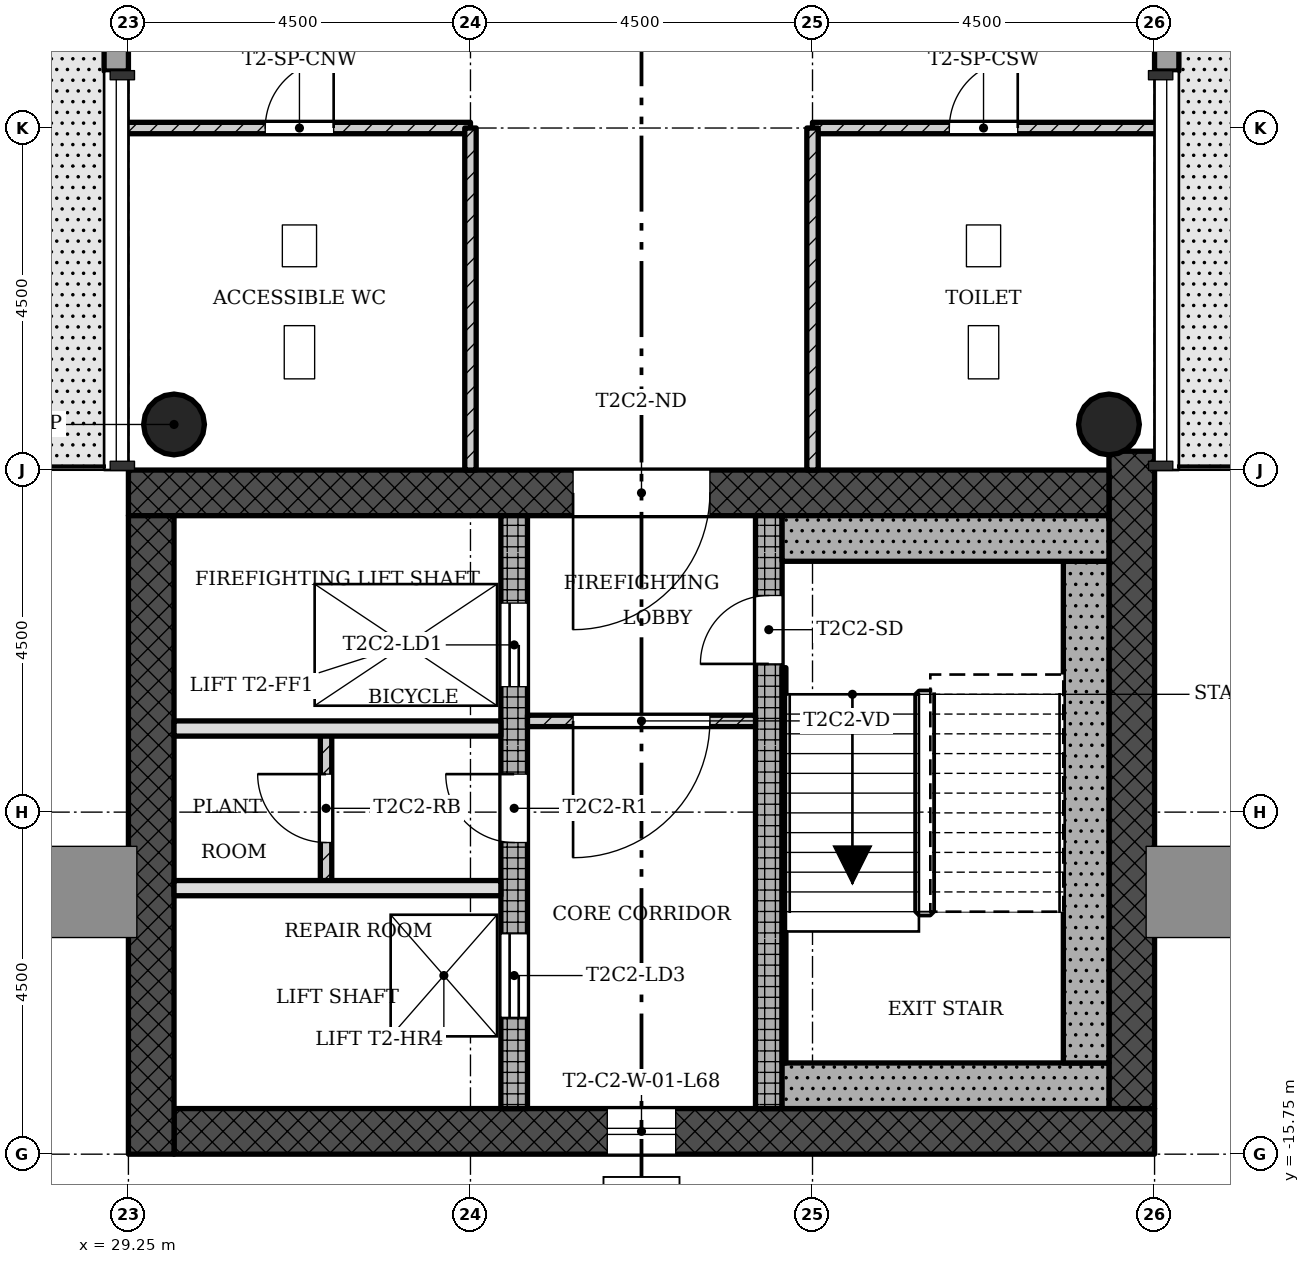
"""IFC4 building model, lengths in metres.
Left out: names, types, materials, properties, quantities, classifications, styles, units other than length and angle.
Written with IfcOpenShell. Run it as: python <this file> out.ifc"""

import sys

from ifc_helpers import new_model, si_unit, direction, frame, frame_2d, origin, origin_2d, place, context, subcontext, project, spatial, rectangle, hollow_circle, extrude, element, fill, save


model = new_model("IFC4")
c1 = context("Model", 3, precision=1e-05, world=origin(), true_north=direction((0.0, 1.0)))
c2 = subcontext(c1, "Body", "Model", "MODEL_VIEW")
j1 = project(units=[si_unit("LENGTHUNIT", "METRE"), si_unit("PLANEANGLEUNIT", "RADIAN")], contexts=[c1])
p1 = place(None, origin())
s1 = spatial("IfcSite", under=j1, at=p1, CompositionType="ELEMENT")
p2 = place(p1, origin())
s2 = spatial("IfcBuilding", under=s1, at=p2, CompositionType="ELEMENT")
p3 = place(p2, frame((0.0, 0.0, 246.9)))
s3 = spatial("IfcBuildingStorey", under=s2, at=p3, CompositionType="ELEMENT", Elevation=246.9)
p4 = place(p3, frame((29.85, -15.45, 0.0), z_axis=(0.0, 0.0, 1.0), x_axis=(1.0, 0.0, 0.0)))
e1 = element("IfcWall", 1, at=p4, inside=s3, PredefinedType="SHEAR", context=c2, shape_type="SweptSolid", body=[
    extrude(rectangle(XDim=12.9, YDim=0.6, at=frame_2d((6.45, 0.0))), origin(), (0.0, 0.0, 1.0), 4.5),
])
p5 = place(p4, frame((5.7, 0.0, 0.45)))
e2 = element("IfcOpeningElement", 2, at=p5, cuts=e1, PredefinedType="OPENING", context=c2, shape_type="SweptSolid", body=[
    extrude(rectangle(XDim=0.9, YDim=2.4, at=frame_2d((0.45, 1.2))), frame((0.0, 0.31, 0.0), z_axis=(0.0, -1.0, 0.0), x_axis=(1.0, 0.0, 0.0)), (0.0, 0.0, 1.0), 0.62),
])
p6 = place(p3, frame((42.45, -15.15, 0.0), z_axis=(0.0, 0.0, 1.0), x_axis=(0.0, 1.0, 0.0)))
e3 = element("IfcWall", 3, at=p6, inside=s3, PredefinedType="SHEAR", context=c2, shape_type="SweptSolid", body=[
    extrude(rectangle(XDim=8.648, YDim=0.6, at=frame_2d((4.324, 0.0))), origin(), (0.0, 0.0, 1.0), 4.5),
])
p7 = place(p3, frame((42.15, -7.05, 0.0), z_axis=(0.0, 0.0, 1.0), x_axis=(-1.0, 0.0, 0.0)))
e4 = element("IfcWall", 4, at=p7, inside=s3, PredefinedType="SHEAR", context=c2, shape_type="SweptSolid", body=[
    extrude(rectangle(XDim=12.9, YDim=0.6, at=frame_2d((6.45, 0.0))), origin(), (0.0, 0.0, 1.0), 4.5),
])
p8 = place(p7, frame((5.25, 0.0, 0.0)))
e5 = element("IfcOpeningElement", 5, at=p8, cuts=e4, PredefinedType="OPENING", context=c2, shape_type="SweptSolid", body=[
    extrude(rectangle(XDim=1.8, YDim=2.1, at=frame_2d((0.9, 1.05))), frame((0.0, 0.31, 0.0), z_axis=(0.0, -1.0, 0.0), x_axis=(1.0, 0.0, 0.0)), (0.0, 0.0, 1.0), 0.62),
])
p9 = place(p3, frame((29.55, -7.35, 0.0), z_axis=(0.0, 0.0, 1.0), x_axis=(0.0, -1.0, 0.0)))
e6 = element("IfcWall", 6, at=p9, inside=s3, PredefinedType="SHEAR", context=c2, shape_type="SweptSolid", body=[
    extrude(rectangle(XDim=8.4, YDim=0.6, at=frame_2d((4.2, 0.0))), origin(), (0.0, 0.0, 1.0), 4.5),
])
p10 = place(p3, frame((34.325, -15.15, 0.0), z_axis=(0.0, 0.0, 1.0), x_axis=(0.0, 1.0, 0.0)))
e7 = element("IfcWall", 7, at=p10, inside=s3, PredefinedType="SHEAR", context=c2, shape_type="SweptSolid", body=[
    extrude(rectangle(XDim=7.8, YDim=0.35, at=frame_2d((3.9, 0.0))), origin(), (0.0, 0.0, 1.0), 4.5),
])
p11 = place(p10, frame((5.55, 0.0, 0.0)))
e8 = element("IfcOpeningElement", 8, at=p11, cuts=e7, PredefinedType="OPENING", context=c2, shape_type="SweptSolid", body=[
    extrude(rectangle(XDim=1.1, YDim=2.1, at=frame_2d((0.55, 1.05))), frame((0.0, 0.185, 0.0), z_axis=(0.0, -1.0, 0.0), x_axis=(1.0, 0.0, 0.0)), (0.0, 0.0, 1.0), 0.37),
])
p12 = place(p10, frame((1.2, 0.0, 0.0)))
e9 = element("IfcOpeningElement", 9, at=p12, cuts=e7, PredefinedType="OPENING", context=c2, shape_type="SweptSolid", body=[
    extrude(rectangle(XDim=1.1, YDim=2.1, at=frame_2d((0.55, 1.05))), frame((0.0, 0.185, 0.0), z_axis=(0.0, -1.0, 0.0), x_axis=(1.0, 0.0, 0.0)), (0.0, 0.0, 1.0), 0.37),
])
p13 = place(p10, frame((3.5, 0.0, 0.0)))
e10 = element("IfcOpeningElement", 10, at=p13, cuts=e7, PredefinedType="OPENING", context=c2, shape_type="SweptSolid", body=[
    extrude(rectangle(XDim=0.9, YDim=2.1, at=frame_2d((0.45, 1.05))), frame((0.0, 0.185, 0.0), z_axis=(0.0, -1.0, 0.0), x_axis=(1.0, 0.0, 0.0)), (0.0, 0.0, 1.0), 0.37),
])
p14 = place(p3, frame((37.675, -15.15, 0.0), z_axis=(0.0, 0.0, 1.0), x_axis=(0.0, 1.0, 0.0)))
e11 = element("IfcWall", 11, at=p14, inside=s3, PredefinedType="SHEAR", context=c2, shape_type="SweptSolid", body=[
    extrude(rectangle(XDim=7.8, YDim=0.35, at=frame_2d((3.9, 0.0))), origin(), (0.0, 0.0, 1.0), 4.5),
])
p15 = place(p14, frame((5.85, 0.0, 0.0)))
e12 = element("IfcOpeningElement", 12, at=p15, cuts=e11, PredefinedType="OPENING", context=c2, shape_type="SweptSolid", body=[
    extrude(rectangle(XDim=0.9, YDim=2.1, at=frame_2d((0.45, 1.05))), frame((0.0, 0.185, 0.0), z_axis=(0.0, -1.0, 0.0), x_axis=(1.0, 0.0, 0.0)), (0.0, 0.0, 1.0), 0.37),
])
for number, where, z_axis, x_axis in (
    (13, (42.15, -6.15, 0.0), (0.0, 0.0, 1.0), (1.0, 0.0, 0.0)),
    (14, (29.85, -6.15, 0.0), (0.0, 0.0, 1.0), (1.0, 0.0, 0.0)),
):
    element("IfcColumn", number, at=place(p3, frame(where, z_axis=z_axis, x_axis=x_axis)), inside=s3, PredefinedType="COLUMN", context=c2, shape_type="SweptSolid", body=[
        extrude(hollow_circle(Radius=0.4, WallThickness=0.028, at=origin_2d()), origin(), (0.0, 0.0, 1.0), 4.5),
    ])
p16 = place(p3, frame((42.91, -1.5, -0.02), z_axis=(0.0, 0.0, 1.0), x_axis=(0.0, 1.0, 0.0)))
e15 = element("IfcWall", 15, at=p16, inside=s3, PredefinedType="STANDARD", context=c2, shape_type="SweptSolid", body=[
    extrude(rectangle(XDim=3.0, YDim=0.32, at=frame_2d((1.5, 0.0))), origin(), (0.0, 0.0, 1.0), 4.22),
])
p17 = place(p16, frame((1.0, 0.0, 0.02)))
e16 = element("IfcOpeningElement", 16, at=p17, cuts=e15, PredefinedType="OPENING", context=c2, shape_type="SweptSolid", body=[
    extrude(rectangle(XDim=1.0, YDim=2.1, at=frame_2d((0.5, 1.05))), frame((0.0, 0.17, 0.0), z_axis=(0.0, -1.0, 0.0), x_axis=(1.0, 0.0, 0.0)), (0.0, 0.0, 1.0), 0.34),
])
p18 = place(p3, frame((29.09, 1.5, -0.02), z_axis=(0.0, 0.0, 1.0), x_axis=(0.0, -1.0, 0.0)))
e17 = element("IfcWall", 17, at=p18, inside=s3, PredefinedType="STANDARD", context=c2, shape_type="SweptSolid", body=[
    extrude(rectangle(XDim=3.0, YDim=0.32, at=frame_2d((1.5, 0.0))), origin(), (0.0, 0.0, 1.0), 4.22),
])
p19 = place(p18, frame((1.0, 0.0, 0.02)))
e18 = element("IfcOpeningElement", 18, at=p19, cuts=e17, PredefinedType="OPENING", context=c2, shape_type="SweptSolid", body=[
    extrude(rectangle(XDim=1.0, YDim=2.1, at=frame_2d((0.5, 1.05))), frame((0.0, 0.17, 0.0), z_axis=(0.0, -1.0, 0.0), x_axis=(1.0, 0.0, 0.0)), (0.0, 0.0, 1.0), 0.34),
])
p20 = place(p3, frame((34.5, -10.05, 0.0), z_axis=(0.0, 0.0, 1.0), x_axis=(1.0, 0.0, 0.0)))
e19 = element("IfcWall", 19, at=p20, inside=s3, PredefinedType="PARTITIONING", context=c2, shape_type="SweptSolid", body=[
    extrude(rectangle(XDim=3.0, YDim=0.15, at=frame_2d((1.5, 0.0))), origin(), (0.0, 0.0, 1.0), 4.1),
])
p21 = place(p20, frame((0.6, 0.0, 0.0)))
e20 = element("IfcOpeningElement", 20, at=p21, cuts=e19, PredefinedType="OPENING", context=c2, shape_type="SweptSolid", body=[
    extrude(rectangle(XDim=1.8, YDim=2.1, at=frame_2d((0.9, 1.05))), frame((0.0, 0.085, 0.0), z_axis=(0.0, -1.0, 0.0), x_axis=(1.0, 0.0, 0.0)), (0.0, 0.0, 1.0), 0.17),
])
for number, where, z_axis, x_axis in (
    (21, (29.85, -12.25, 0.0), (0.0, 0.0, 1.0), (1.0, 0.0, 0.0)),
    (22, (29.85, -10.15, 0.0), (0.0, 0.0, 1.0), (1.0, 0.0, 0.0)),
):
    element("IfcWall", number, at=place(p3, frame(where, z_axis=z_axis, x_axis=x_axis)), inside=s3, PredefinedType="SOLIDWALL", context=c2, shape_type="SweptSolid", body=[
        extrude(rectangle(XDim=4.3, YDim=0.2, at=frame_2d((2.15, 0.0))), origin(), (0.0, 0.0, 1.0), 4.1),
    ])
p22 = place(p3, frame((31.85, -10.15, 0.0), z_axis=(0.0, 0.0, 1.0), x_axis=(0.0, -1.0, 0.0)))
e23 = element("IfcWall", 23, at=p22, inside=s3, PredefinedType="PARTITIONING", context=c2, shape_type="SweptSolid", body=[
    extrude(rectangle(XDim=2.1, YDim=0.15, at=frame_2d((1.05, 0.0))), origin(), (0.0, 0.0, 1.0), 4.1),
])
p23 = place(p22, frame((0.6, 0.0, 0.0)))
e24 = element("IfcOpeningElement", 24, at=p23, cuts=e23, PredefinedType="OPENING", context=c2, shape_type="SweptSolid", body=[
    extrude(rectangle(XDim=0.9, YDim=2.1, at=frame_2d((0.45, 1.05))), frame((0.0, 0.085, 0.0), z_axis=(0.0, -1.0, 0.0), x_axis=(1.0, 0.0, 0.0)), (0.0, 0.0, 1.0), 0.17),
])
p24 = place(p3, frame((33.75, -2.25, 0.0), z_axis=(0.0, 0.0, 1.0), x_axis=(-1.0, 0.0, 0.0)))
e25 = element("IfcWall", 25, at=p24, inside=s3, PredefinedType="PARTITIONING", context=c2, shape_type="SweptSolid", body=[
    extrude(rectangle(XDim=4.6, YDim=0.15, at=frame_2d((2.3, 0.0))), origin(), (0.0, 0.0, 1.0), 4.1),
])
p25 = place(p24, frame((1.8, 0.0, 0.0)))
e26 = element("IfcOpeningElement", 26, at=p25, cuts=e25, PredefinedType="OPENING", context=c2, shape_type="SweptSolid", body=[
    extrude(rectangle(XDim=0.9, YDim=2.1, at=frame_2d((0.45, 1.05))), frame((0.0, 0.085, 0.0), z_axis=(0.0, -1.0, 0.0), x_axis=(1.0, 0.0, 0.0)), (0.0, 0.0, 1.0), 0.17),
])
p26 = place(p3, frame((33.75, -6.75, 0.0), z_axis=(0.0, 0.0, 1.0), x_axis=(0.0, 1.0, 0.0)))
e27 = element("IfcWall", 27, at=p26, inside=s3, PredefinedType="PARTITIONING", context=c2, shape_type="SweptSolid", body=[
    extrude(rectangle(XDim=4.5, YDim=0.15, at=frame_2d((2.25, 0.0))), origin(), (0.0, 0.0, 1.0), 4.1),
])
p27 = place(p3, frame((42.85, -2.25, 0.0), z_axis=(0.0, 0.0, 1.0), x_axis=(-1.0, 0.0, 0.0)))
e28 = element("IfcWall", 28, at=p27, inside=s3, PredefinedType="PARTITIONING", context=c2, shape_type="SweptSolid", body=[
    extrude(rectangle(XDim=4.6, YDim=0.15, at=frame_2d((2.3, 0.0))), origin(), (0.0, 0.0, 1.0), 4.1),
])
p28 = place(p27, frame((1.9, 0.0, 0.0)))
e29 = element("IfcOpeningElement", 29, at=p28, cuts=e28, PredefinedType="OPENING", context=c2, shape_type="SweptSolid", body=[
    extrude(rectangle(XDim=0.9, YDim=2.1, at=frame_2d((0.45, 1.05))), frame((0.0, 0.085, 0.0), z_axis=(0.0, -1.0, 0.0), x_axis=(1.0, 0.0, 0.0)), (0.0, 0.0, 1.0), 0.17),
])
p29 = place(p3, frame((38.25, -6.75, 0.0), z_axis=(0.0, 0.0, 1.0), x_axis=(0.0, 1.0, 0.0)))
e30 = element("IfcWall", 30, at=p29, inside=s3, PredefinedType="PARTITIONING", context=c2, shape_type="SweptSolid", body=[
    extrude(rectangle(XDim=4.5, YDim=0.15, at=frame_2d((2.25, 0.0))), origin(), (0.0, 0.0, 1.0), 4.1),
])
p30 = place(p3, frame((37.85, -14.85, 0.0), z_axis=(0.0, 0.0, 1.0), x_axis=(1.0, 0.0, 0.0)))
e31 = element("IfcWall", 31, at=p30, inside=s3, PredefinedType="SHEAR", context=c2, shape_type="SweptSolid", body=[
    extrude(rectangle(XDim=4.3, YDim=0.6, at=frame_2d((2.15, 0.0))), origin(), (0.0, 0.0, 1.0), 4.5),
])
p31 = place(p3, frame((41.85, -7.95, 0.0), z_axis=(0.0, 0.0, 1.0), x_axis=(0.0, -1.0, 0.0)))
e32 = element("IfcWall", 32, at=p31, inside=s3, PredefinedType="SHEAR", context=c2, shape_type="SweptSolid", body=[
    extrude(rectangle(XDim=6.6, YDim=0.6, at=frame_2d((3.3, 0.0))), origin(), (0.0, 0.0, 1.0), 4.5),
])
p32 = place(p3, frame((37.85, -7.65, 0.0), z_axis=(0.0, 0.0, 1.0), x_axis=(1.0, 0.0, 0.0)))
e33 = element("IfcWall", 33, at=p32, inside=s3, PredefinedType="SHEAR", context=c2, shape_type="SweptSolid", body=[
    extrude(rectangle(XDim=4.3, YDim=0.6, at=frame_2d((2.15, 0.0))), origin(), (0.0, 0.0, 1.0), 4.5),
])
p33 = place(p3, frame((37.875, -9.35, 0.0), z_axis=(0.0, 0.0, 1.0), x_axis=(0.0, -1.0, 0.0)))
e34 = element("IfcWall", 34, at=p33, inside=s3, PredefinedType="SHEAR", context=c2, shape_type="SweptSolid", body=[
    extrude(rectangle(XDim=5.2, YDim=0.05, at=frame_2d((2.6, 0.0))), origin(), (0.0, 0.0, 1.0), 4.5),
])
p34 = place(p5, origin())
e35 = element("IfcWindow", 35, at=p34, inside=s3, PartitioningType="SINGLE_PANEL", PredefinedType="WINDOW", context=c2, shape_type="SweptSolid", body=[
    extrude(rectangle(XDim=0.9, YDim=2.4, at=frame_2d((0.45, 1.2))), frame((0.0, 0.03, 0.0), z_axis=(0.0, -1.0, 0.0), x_axis=(1.0, 0.0, 0.0)), (0.0, 0.0, 1.0), 0.06),
])
fill(e2, e35)
p35 = place(p21, origin())
e36 = element("IfcDoor", 36, at=p35, inside=s3, OperationType="SINGLE_SWING_LEFT", PredefinedType="DOOR", context=c2, shape_type="SweptSolid", body=[
    extrude(rectangle(XDim=1.8, YDim=2.1, at=frame_2d((0.9, 1.05))), frame((0.0, 0.025, 0.0), z_axis=(0.0, -1.0, 0.0), x_axis=(1.0, 0.0, 0.0)), (0.0, 0.0, 1.0), 0.05),
])
fill(e20, e36)
p36 = place(p23, origin())
e37 = element("IfcDoor", 37, at=p36, inside=s3, OperationType="SINGLE_SWING_LEFT", PredefinedType="DOOR", context=c2, shape_type="SweptSolid", body=[
    extrude(rectangle(XDim=0.9, YDim=2.1, at=frame_2d((0.45, 1.05))), frame((0.0, 0.025, 0.0), z_axis=(0.0, -1.0, 0.0), x_axis=(1.0, 0.0, 0.0)), (0.0, 0.0, 1.0), 0.05),
])
fill(e24, e37)
p37 = place(p25, origin())
e38 = element("IfcDoor", 38, at=p37, inside=s3, OperationType="SINGLE_SWING_LEFT", PredefinedType="DOOR", context=c2, shape_type="SweptSolid", body=[
    extrude(rectangle(XDim=0.9, YDim=2.1, at=frame_2d((0.45, 1.05))), frame((0.0, 0.025, 0.0), z_axis=(0.0, -1.0, 0.0), x_axis=(1.0, 0.0, 0.0)), (0.0, 0.0, 1.0), 0.05),
])
fill(e26, e38)
p38 = place(p28, origin())
e39 = element("IfcDoor", 39, at=p38, inside=s3, OperationType="SINGLE_SWING_LEFT", PredefinedType="DOOR", context=c2, shape_type="SweptSolid", body=[
    extrude(rectangle(XDim=0.9, YDim=2.1, at=frame_2d((0.45, 1.05))), frame((0.0, 0.025, 0.0), z_axis=(0.0, -1.0, 0.0), x_axis=(1.0, 0.0, 0.0)), (0.0, 0.0, 1.0), 0.05),
])
fill(e29, e39)
p39 = place(p15, origin())
e40 = element("IfcDoor", 40, at=p39, inside=s3, OperationType="SINGLE_SWING_RIGHT", PredefinedType="DOOR", context=c2, shape_type="SweptSolid", body=[
    extrude(rectangle(XDim=0.9, YDim=2.1, at=frame_2d((0.45, 1.05))), frame((0.0, 0.025, 0.0), z_axis=(0.0, -1.0, 0.0), x_axis=(1.0, 0.0, 0.0)), (0.0, 0.0, 1.0), 0.05),
])
fill(e12, e40)
p40 = place(p11, origin())
e41 = element("IfcDoor", 41, at=p40, inside=s3, OperationType="SLIDING_TO_LEFT", PredefinedType="DOOR", context=c2, shape_type="SweptSolid", body=[
    extrude(rectangle(XDim=1.1, YDim=2.1, at=frame_2d((0.55, 1.05))), frame((0.0, 0.025, 0.0), z_axis=(0.0, -1.0, 0.0), x_axis=(1.0, 0.0, 0.0)), (0.0, 0.0, 1.0), 0.05),
])
fill(e8, e41)
p41 = place(p12, origin())
e42 = element("IfcDoor", 42, at=p41, inside=s3, OperationType="SLIDING_TO_LEFT", PredefinedType="DOOR", context=c2, shape_type="SweptSolid", body=[
    extrude(rectangle(XDim=1.1, YDim=2.1, at=frame_2d((0.55, 1.05))), frame((0.0, 0.025, 0.0), z_axis=(0.0, -1.0, 0.0), x_axis=(1.0, 0.0, 0.0)), (0.0, 0.0, 1.0), 0.05),
])
fill(e9, e42)
p42 = place(p13, origin())
e43 = element("IfcDoor", 43, at=p42, inside=s3, OperationType="SINGLE_SWING_LEFT", PredefinedType="DOOR", context=c2, shape_type="SweptSolid", body=[
    extrude(rectangle(XDim=0.9, YDim=2.1, at=frame_2d((0.45, 1.05))), frame((0.0, 0.025, 0.0), z_axis=(0.0, -1.0, 0.0), x_axis=(1.0, 0.0, 0.0)), (0.0, 0.0, 1.0), 0.05),
])
fill(e10, e43)
p43 = place(p8, origin())
e44 = element("IfcDoor", 44, at=p43, inside=s3, OperationType="SINGLE_SWING_LEFT", PredefinedType="DOOR", context=c2, shape_type="SweptSolid", body=[
    extrude(rectangle(XDim=1.8, YDim=2.1, at=frame_2d((0.9, 1.05))), frame((0.0, 0.025, 0.0), z_axis=(0.0, -1.0, 0.0), x_axis=(1.0, 0.0, 0.0)), (0.0, 0.0, 1.0), 0.05),
])
fill(e5, e44)
save(model, sys.argv[1])
